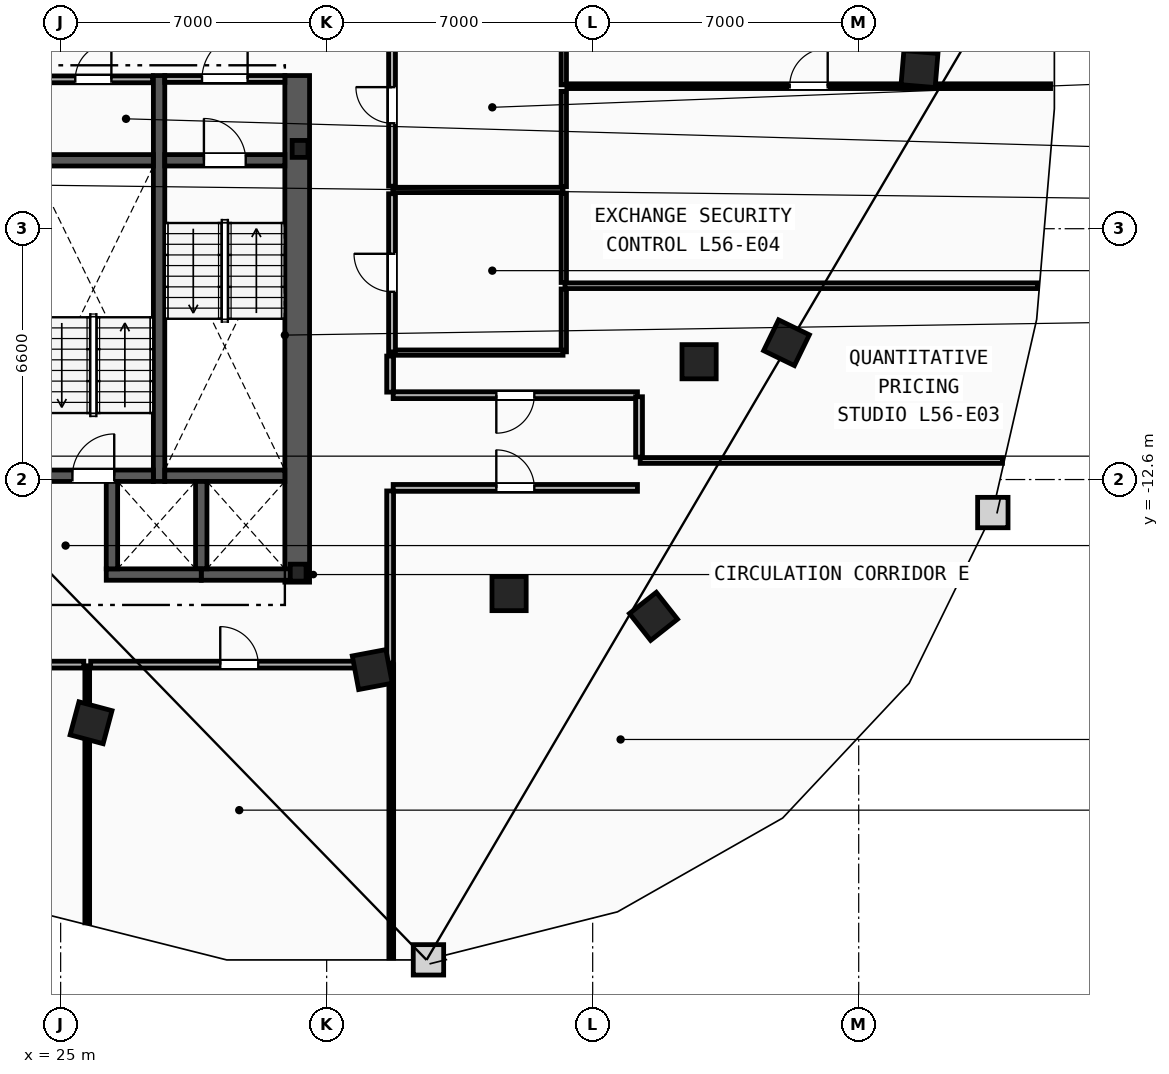
"""IFC4 building model, lengths in metres.
Left out: names, types, materials, properties, quantities, classifications, styles, units other than length and angle.
Written with IfcOpenShell. Run it as: python <this file> out.ifc"""

import sys

from ifc_helpers import new_model, si_unit, direction, frame, frame_2d, origin, origin_2d, place, context, subcontext, project, spatial, rectangle, i_section, extrude, element, fill, save


model = new_model("IFC4")
c1 = context("Model", 3, precision=1e-05, world=origin(), true_north=direction((0.0, 1.0)))
c2 = subcontext(c1, "Body", "Model", "MODEL_VIEW")
j1 = project(units=[si_unit("LENGTHUNIT", "METRE"), si_unit("PLANEANGLEUNIT", "RADIAN")], contexts=[c1])
p1 = place(None, origin())
s1 = spatial("IfcSite", under=j1, at=p1, CompositionType="ELEMENT")
p2 = place(p1, origin())
s2 = spatial("IfcBuilding", under=s1, at=p2, CompositionType="ELEMENT")
p3 = place(p2, frame((0.0, 0.0, 213.4)))
s3 = spatial("IfcBuildingStorey", under=s2, at=p3, CompositionType="ELEMENT", Elevation=213.4)
for number, where, z_axis, x_axis in (
    (1, (31.3, -3.9, 0.0), (0.0, 0.0, 1.0), (1.0, 0.0, 0.0)),
    (2, (31.25, -15.05, 0.0), (0.0, 0.0, 1.0), (1.0, 0.0, 0.0)),
):
    element("IfcColumn", number, at=place(p3, frame(where, z_axis=z_axis, x_axis=x_axis)), inside=s3, PredefinedType="COLUMN", context=c2, shape_type="SweptSolid", body=[
        extrude(i_section(OverallWidth=0.416, OverallDepth=0.446, WebThickness=0.039, FlangeThickness=0.063, FilletRadius=0.018, at=origin_2d()), origin(), (0.0, 0.0, 1.0), 3.6),
    ])
for number, where, z_axis, x_axis in (
    (3, (41.8, -9.5, 0.0), (0.0, 0.0, 1.0), (1.0, 0.0, 0.0)),
    (4, (36.8, -15.6, 0.0), (0.0, 0.0, 1.0), (1.0, 0.0, 0.0)),
    (5, (25.8, -19.0, 0.0), (0.0, 0.0, 1.0), (0.966, -0.259, 0.0)),
    (6, (33.2, -17.6, 0.0), (0.0, 0.0, 1.0), (0.983, 0.186, 0.0)),
    (7, (40.6, -16.2, 0.0), (0.0, 0.0, 1.0), (0.785, 0.619, 0.0)),
    (8, (44.1, -9.0, 0.0), (0.0, 0.0, 1.0), (0.437, 0.899, 0.0)),
    (9, (47.6, -1.8, 0.0), (0.0, 0.0, 1.0), (0.084, 0.997, 0.0)),
):
    element("IfcColumn", number, at=place(p3, frame(where, z_axis=z_axis, x_axis=x_axis)), inside=s3, PredefinedType="COLUMN", context=c2, shape_type="SweptSolid", body=[
        extrude(rectangle(XDim=0.9, YDim=0.9, at=origin_2d()), origin(), (0.0, 0.0, 1.0), 3.6),
    ])
p4 = place(p3, frame((31.225, -15.3, 0.0), z_axis=(0.0, 0.0, 1.0), x_axis=(0.0, 1.0, 0.0)))
e10 = element("IfcWall", 10, at=p4, inside=s3, PredefinedType="SHEAR", context=c2, shape_type="SweptSolid", body=[
    extrude(rectangle(XDim=13.33, YDim=0.65, at=frame_2d((6.665, 0.0))), origin(), (0.0, 0.0, 1.0), 3.34),
])
p5 = place(p3, frame((27.59, -12.65, 0.0), z_axis=(0.0, 0.0, 1.0), x_axis=(0.0, 1.0, 0.0)))
e11 = element("IfcWall", 11, at=p5, inside=s3, PredefinedType="SHEAR", context=c2, shape_type="SweptSolid", body=[
    extrude(rectangle(XDim=10.68, YDim=0.3, at=frame_2d((5.34, 0.0))), origin(), (0.0, 0.0, 1.0), 3.34),
])
p6 = place(p3, frame((27.74, -4.2, 0.0), z_axis=(0.0, 0.0, 1.0), x_axis=(1.0, 0.0, 0.0)))
e12 = element("IfcWall", 12, at=p6, inside=s3, PredefinedType="SHEAR", context=c2, shape_type="SweptSolid", body=[
    extrude(rectangle(XDim=3.16, YDim=0.3, at=frame_2d((1.58, 0.0))), origin(), (0.0, 0.0, 1.0), 3.34),
])
p7 = place(p6, frame((1.03, 0.0, 0.0)))
e13 = element("IfcOpeningElement", 13, at=p7, cuts=e12, PredefinedType="OPENING", context=c2, shape_type="SweptSolid", body=[
    extrude(rectangle(XDim=1.1, YDim=2.15, at=frame_2d((0.55, 1.075))), frame((0.0, 0.16, 0.0), z_axis=(0.0, -1.0, 0.0), x_axis=(1.0, 0.0, 0.0)), (0.0, 0.0, 1.0), 0.32),
])
p8 = place(p3, frame((27.74, -12.5, 0.0), z_axis=(0.0, 0.0, 1.0), x_axis=(1.0, 0.0, 0.0)))
e14 = element("IfcWall", 14, at=p8, inside=s3, PredefinedType="SHEAR", context=c2, shape_type="SweptSolid", body=[
    extrude(rectangle(XDim=3.16, YDim=0.3, at=frame_2d((1.58, 0.0))), origin(), (0.0, 0.0, 1.0), 3.34),
])
p9 = place(p3, frame((24.28, -12.5, 0.0), z_axis=(0.0, 0.0, 1.0), x_axis=(1.0, 0.0, 0.0)))
e15 = element("IfcWall", 15, at=p9, inside=s3, PredefinedType="SHEAR", context=c2, shape_type="SweptSolid", body=[
    extrude(rectangle(XDim=3.16, YDim=0.3, at=frame_2d((1.58, 0.0))), origin(), (0.0, 0.0, 1.0), 3.34),
])
p10 = place(p9, frame((1.03, 0.0, 0.0)))
e16 = element("IfcOpeningElement", 16, at=p10, cuts=e15, PredefinedType="OPENING", context=c2, shape_type="SweptSolid", body=[
    extrude(rectangle(XDim=1.1, YDim=2.15, at=frame_2d((0.55, 1.075))), frame((0.0, 0.16, 0.0), z_axis=(0.0, -1.0, 0.0), x_axis=(1.0, 0.0, 0.0)), (0.0, 0.0, 1.0), 0.32),
])
p11 = place(p3, frame((24.28, -4.2, 0.0), z_axis=(0.0, 0.0, 1.0), x_axis=(1.0, 0.0, 0.0)))
e17 = element("IfcWall", 17, at=p11, inside=s3, PredefinedType="SHEAR", context=c2, shape_type="SweptSolid", body=[
    extrude(rectangle(XDim=3.16, YDim=0.3, at=frame_2d((1.58, 0.0))), origin(), (0.0, 0.0, 1.0), 3.34),
])
p12 = place(p3, frame((27.74, -2.06, 0.0), z_axis=(0.0, 0.0, 1.0), x_axis=(1.0, 0.0, 0.0)))
e18 = element("IfcWall", 18, at=p12, inside=s3, PredefinedType="PARTITIONING", context=c2, shape_type="SweptSolid", body=[
    extrude(rectangle(XDim=3.16, YDim=0.18, at=frame_2d((1.58, 0.0))), origin(), (0.0, 0.0, 1.0), 3.34),
])
p13 = place(p12, frame((0.98, 0.0, 0.0)))
e19 = element("IfcOpeningElement", 19, at=p13, cuts=e18, PredefinedType="OPENING", context=c2, shape_type="SweptSolid", body=[
    extrude(rectangle(XDim=1.2, YDim=2.15, at=frame_2d((0.6, 1.075))), frame((0.0, 0.1, 0.0), z_axis=(0.0, -1.0, 0.0), x_axis=(1.0, 0.0, 0.0)), (0.0, 0.0, 1.0), 0.2),
])
p14 = place(p3, frame((28.7, -15.1, 0.0), z_axis=(0.0, 0.0, 1.0), x_axis=(1.0, 0.0, 0.0)))
e20 = element("IfcWall", 20, at=p14, inside=s3, PredefinedType="SHEAR", context=c2, shape_type="SweptSolid", body=[
    extrude(rectangle(XDim=2.5, YDim=0.3, at=frame_2d((1.25, 0.0))), origin(), (0.0, 0.0, 1.0), 3.34),
])
p15 = place(p3, frame((28.7, -14.95, 0.0), z_axis=(0.0, 0.0, 1.0), x_axis=(0.0, 1.0, 0.0)))
e21 = element("IfcWall", 21, at=p15, inside=s3, PredefinedType="SHEAR", context=c2, shape_type="SweptSolid", body=[
    extrude(rectangle(XDim=2.3, YDim=0.3, at=frame_2d((1.15, 0.0))), origin(), (0.0, 0.0, 1.0), 3.34),
])
p16 = place(p3, frame((26.2, -15.1, 0.0), z_axis=(0.0, 0.0, 1.0), x_axis=(1.0, 0.0, 0.0)))
e22 = element("IfcWall", 22, at=p16, inside=s3, PredefinedType="SHEAR", context=c2, shape_type="SweptSolid", body=[
    extrude(rectangle(XDim=2.5, YDim=0.3, at=frame_2d((1.25, 0.0))), origin(), (0.0, 0.0, 1.0), 3.34),
])
p17 = place(p3, frame((26.35, -14.95, 0.0), z_axis=(0.0, 0.0, 1.0), x_axis=(0.0, 1.0, 0.0)))
e23 = element("IfcWall", 23, at=p17, inside=s3, PredefinedType="SHEAR", context=c2, shape_type="SweptSolid", body=[
    extrude(rectangle(XDim=2.3, YDim=0.3, at=frame_2d((1.15, 0.0))), origin(), (0.0, 0.0, 1.0), 3.34),
])
p18 = place(p3, frame((24.3, -2.07, 0.0), z_axis=(0.0, 0.0, 1.0), x_axis=(1.0, 0.0, 0.0)))
e24 = element("IfcWall", 24, at=p18, inside=s3, PredefinedType="PARTITIONING", context=c2, shape_type="SweptSolid", body=[
    extrude(rectangle(XDim=3.12, YDim=0.18, at=frame_2d((1.56, 0.0))), origin(), (0.0, 0.0, 1.0), 3.34),
])
p19 = place(p18, frame((1.085, 0.0, 0.0)))
e25 = element("IfcOpeningElement", 25, at=p19, cuts=e24, PredefinedType="OPENING", context=c2, shape_type="SweptSolid", body=[
    extrude(rectangle(XDim=0.95, YDim=2.1, at=frame_2d((0.475, 1.05))), frame((0.0, 0.1, 0.0), z_axis=(0.0, -1.0, 0.0), x_axis=(1.0, 0.0, 0.0)), (0.0, 0.0, 1.0), 0.2),
])
p20 = place(p3, frame((38.24, -9.24, 0.0), z_axis=(0.0, 0.0, 1.0), x_axis=(0.0, 1.0, 0.0)))
e26 = element("IfcWall", 26, at=p20, inside=s3, PredefinedType="PARTITIONING", context=c2, shape_type="SweptSolid", body=[
    extrude(rectangle(XDim=1.655, YDim=0.14, at=frame_2d((0.828, 0.0))), origin(), (0.0, 0.0, 1.0), 3.34),
])
p21 = place(p3, frame((38.24, -7.415, 0.0), z_axis=(0.0, 0.0, 1.0), x_axis=(0.0, 1.0, 0.0)))
e27 = element("IfcWall", 27, at=p21, inside=s3, PredefinedType="PARTITIONING", context=c2, shape_type="SweptSolid", body=[
    extrude(rectangle(XDim=2.35, YDim=0.14, at=frame_2d((1.175, 0.0))), origin(), (0.0, 0.0, 1.0), 3.34),
])
p22 = place(p3, frame((38.24, -4.895, 0.0), z_axis=(0.0, 0.0, 1.0), x_axis=(0.0, 1.0, 0.0)))
e28 = element("IfcWall", 28, at=p22, inside=s3, PredefinedType="PARTITIONING", context=c2, shape_type="SweptSolid", body=[
    extrude(rectangle(XDim=2.51, YDim=0.14, at=frame_2d((1.255, 0.0))), origin(), (0.0, 0.0, 1.0), 3.34),
])
p23 = place(p3, frame((38.24, -2.215, 0.0), z_axis=(0.0, 0.0, 1.0), x_axis=(0.0, 1.0, 0.0)))
e29 = element("IfcWall", 29, at=p23, inside=s3, PredefinedType="PARTITIONING", context=c2, shape_type="SweptSolid", body=[
    extrude(rectangle(XDim=1.595, YDim=0.14, at=frame_2d((0.797, 0.0))), origin(), (0.0, 0.0, 1.0), 3.34),
])
for number, where, z_axis, x_axis in (
    (30, (33.74, -4.98, 0.0), (0.0, 0.0, 1.0), (1.0, 0.0, 0.0)),
    (31, (33.74, -9.26, 0.0), (0.0, 0.0, 1.0), (1.0, 0.0, 0.0)),
):
    element("IfcWall", number, at=place(p3, frame(where, z_axis=z_axis, x_axis=x_axis)), inside=s3, PredefinedType="PARTITIONING", context=c2, shape_type="SweptSolid", body=[
        extrude(rectangle(XDim=4.48, YDim=0.14, at=frame_2d((2.24, 0.0))), origin(), (0.0, 0.0, 1.0), 3.34),
    ])
p24 = place(p3, frame((33.72, -4.88, 0.0), z_axis=(0.0, 0.0, 1.0), x_axis=(0.0, 1.0, 0.0)))
e32 = element("IfcWall", 32, at=p24, inside=s3, PredefinedType="PARTITIONING", context=c2, shape_type="SweptSolid", body=[
    extrude(rectangle(XDim=4.26, YDim=0.18, at=frame_2d((2.13, 0.0))), origin(), (0.0, 0.0, 1.0), 3.34),
])
p25 = place(p24, frame((1.655, 0.0, 0.0)))
e33 = element("IfcOpeningElement", 33, at=p25, cuts=e32, PredefinedType="OPENING", context=c2, shape_type="SweptSolid", body=[
    extrude(rectangle(XDim=0.95, YDim=2.1, at=frame_2d((0.475, 1.05))), frame((0.0, 0.1, 0.0), z_axis=(0.0, -1.0, 0.0), x_axis=(1.0, 0.0, 0.0)), (0.0, 0.0, 1.0), 0.2),
])
p26 = place(p3, frame((33.72, -9.24, 0.0), z_axis=(0.0, 0.0, 1.0), x_axis=(0.0, 1.0, 0.0)))
e34 = element("IfcWall", 34, at=p26, inside=s3, PredefinedType="PARTITIONING", context=c2, shape_type="SweptSolid", body=[
    extrude(rectangle(XDim=4.16, YDim=0.18, at=frame_2d((2.08, 0.0))), origin(), (0.0, 0.0, 1.0), 3.34),
])
p27 = place(p26, frame((1.58, 0.0, 0.0)))
e35 = element("IfcOpeningElement", 35, at=p27, cuts=e34, PredefinedType="OPENING", context=c2, shape_type="SweptSolid", body=[
    extrude(rectangle(XDim=1.0, YDim=2.15, at=frame_2d((0.5, 1.075))), frame((0.0, 0.1, 0.0), z_axis=(0.0, -1.0, 0.0), x_axis=(1.0, 0.0, 0.0)), (0.0, 0.0, 1.0), 0.2),
])
p28 = place(p3, frame((38.27, -7.5, 0.0), z_axis=(0.0, 0.0, 1.0), x_axis=(1.0, 0.0, 0.0)))
e36 = element("IfcWall", 36, at=p28, inside=s3, PredefinedType="PARTITIONING", context=c2, shape_type="SweptSolid", body=[
    extrude(rectangle(XDim=12.438, YDim=0.15, at=frame_2d((6.219, 0.0))), origin(), (0.0, 0.0, 1.0), 3.34),
])
p29 = place(p3, frame((40.25, -12.1, 0.0), z_axis=(0.0, 0.0, 1.0), x_axis=(1.0, 0.0, 0.0)))
e37 = element("IfcWall", 37, at=p29, inside=s3, PredefinedType="PARTITIONING", context=c2, shape_type="SweptSolid", body=[
    extrude(rectangle(XDim=9.532, YDim=0.15, at=frame_2d((4.766, 0.0))), origin(), (0.0, 0.0, 1.0), 3.34),
])
p30 = place(p3, frame((25.7, -24.265, 0.0), z_axis=(0.0, 0.0, 1.0), x_axis=(0.0, 1.0, 0.0)))
e38 = element("IfcWall", 38, at=p30, inside=s3, PredefinedType="PARTITIONING", context=c2, shape_type="SweptSolid", body=[
    extrude(rectangle(XDim=6.765, YDim=0.125, at=frame_2d((3.382, 0.0))), origin(), (0.0, 0.0, 1.0), 3.34),
])
p31 = place(p3, frame((33.7, -25.19, 0.0), z_axis=(0.0, 0.0, 1.0), x_axis=(0.0, 1.0, 0.0)))
e39 = element("IfcWall", 39, at=p31, inside=s3, PredefinedType="PARTITIONING", context=c2, shape_type="SweptSolid", body=[
    extrude(rectangle(XDim=7.72, YDim=0.125, at=frame_2d((3.86, 0.0))), origin(), (0.0, 0.0, 1.0), 3.34),
])
p32 = place(p3, frame((25.79, -17.47, 0.0), z_axis=(0.0, 0.0, 1.0), x_axis=(1.0, 0.0, 0.0)))
e40 = element("IfcWall", 40, at=p32, inside=s3, PredefinedType="PARTITIONING", context=c2, shape_type="SweptSolid", body=[
    extrude(rectangle(XDim=7.82, YDim=0.18, at=frame_2d((3.91, 0.0))), origin(), (0.0, 0.0, 1.0), 3.34),
])
p33 = place(p32, frame((3.41, 0.0, 0.0)))
e41 = element("IfcOpeningElement", 41, at=p33, cuts=e40, PredefinedType="OPENING", context=c2, shape_type="SweptSolid", body=[
    extrude(rectangle(XDim=1.0, YDim=2.15, at=frame_2d((0.5, 1.075))), frame((0.0, 0.1, 0.0), z_axis=(0.0, -1.0, 0.0), x_axis=(1.0, 0.0, 0.0)), (0.0, 0.0, 1.0), 0.2),
])
p34 = place(p3, frame((33.75, -12.82, 0.0), z_axis=(0.0, 0.0, 1.0), x_axis=(1.0, 0.0, 0.0)))
e42 = element("IfcWall", 42, at=p34, inside=s3, PredefinedType="PARTITIONING", context=c2, shape_type="SweptSolid", body=[
    extrude(rectangle(XDim=6.428, YDim=0.18, at=frame_2d((3.214, 0.0))), origin(), (0.0, 0.0, 1.0), 3.34),
])
p35 = place(p34, frame((2.714, 0.0, 0.0)))
e43 = element("IfcOpeningElement", 43, at=p35, cuts=e42, PredefinedType="OPENING", context=c2, shape_type="SweptSolid", body=[
    extrude(rectangle(XDim=1.0, YDim=2.15, at=frame_2d((0.5, 1.075))), frame((0.0, 0.1, 0.0), z_axis=(0.0, -1.0, 0.0), x_axis=(1.0, 0.0, 0.0)), (0.0, 0.0, 1.0), 0.2),
])
p36 = place(p3, frame((33.67, -17.43, 0.0), z_axis=(0.0, 0.0, 1.0), x_axis=(0.0, 1.0, 0.0)))
e44 = element("IfcWall", 44, at=p36, inside=s3, PredefinedType="PARTITIONING", context=c2, shape_type="SweptSolid", body=[
    extrude(rectangle(XDim=4.53, YDim=0.18, at=frame_2d((2.265, 0.0))), origin(), (0.0, 0.0, 1.0), 3.34),
])
p37 = place(p3, frame((40.178, -10.38, 0.0), z_axis=(0.0, 0.0, 1.0), x_axis=(-1.0, 0.0, 0.0)))
e45 = element("IfcWall", 45, at=p37, inside=s3, PredefinedType="PARTITIONING", context=c2, shape_type="SweptSolid", body=[
    extrude(rectangle(XDim=6.428, YDim=0.18, at=frame_2d((3.214, 0.0))), origin(), (0.0, 0.0, 1.0), 3.34),
])
p38 = place(p37, frame((2.714, 0.0, 0.0)))
e46 = element("IfcOpeningElement", 46, at=p38, cuts=e45, PredefinedType="OPENING", context=c2, shape_type="SweptSolid", body=[
    extrude(rectangle(XDim=1.0, YDim=2.15, at=frame_2d((0.5, 1.075))), frame((0.0, 0.1, 0.0), z_axis=(0.0, -1.0, 0.0), x_axis=(1.0, 0.0, 0.0)), (0.0, 0.0, 1.0), 0.2),
])
p39 = place(p3, frame((40.22, -12.01, 0.0), z_axis=(0.0, 0.0, 1.0), x_axis=(0.0, 1.0, 0.0)))
e47 = element("IfcWall", 47, at=p39, inside=s3, PredefinedType="PARTITIONING", context=c2, shape_type="SweptSolid", body=[
    extrude(rectangle(XDim=1.589, YDim=0.18, at=frame_2d((0.794, 0.0))), origin(), (0.0, 0.0, 1.0), 3.34),
])
p40 = place(p3, frame((33.67, -10.3, 0.0), z_axis=(0.0, 0.0, 1.0), x_axis=(0.0, 1.0, 0.0)))
e48 = element("IfcWall", 48, at=p40, inside=s3, PredefinedType="PARTITIONING", context=c2, shape_type="SweptSolid", body=[
    extrude(rectangle(XDim=0.949, YDim=0.18, at=frame_2d((0.474, 0.0))), origin(), (0.0, 0.0, 1.0), 3.34),
])
p41 = place(p3, frame((16.822, -17.47, 0.0), z_axis=(0.0, 0.0, 1.0), x_axis=(1.0, 0.0, 0.0)))
e49 = element("IfcWall", 49, at=p41, inside=s3, PredefinedType="PARTITIONING", context=c2, shape_type="SweptSolid", body=[
    extrude(rectangle(XDim=8.789, YDim=0.18, at=frame_2d((4.394, 0.0))), origin(), (0.0, 0.0, 1.0), 3.34),
])
p42 = place(p3, frame((38.32, -2.25, 0.0), z_axis=(0.0, 0.0, 1.0), x_axis=(1.0, 0.0, 0.0)))
e50 = element("IfcWall", 50, at=p42, inside=s3, PredefinedType="PARTITIONING", context=c2, shape_type="SweptSolid", body=[
    extrude(rectangle(XDim=12.729, YDim=0.125, at=frame_2d((6.365, 0.0))), origin(), (0.0, 0.0, 1.0), 3.34),
])
p43 = place(p42, frame((5.865, 0.0, 0.0)))
e51 = element("IfcOpeningElement", 51, at=p43, cuts=e50, PredefinedType="OPENING", context=c2, shape_type="SweptSolid", body=[
    extrude(rectangle(XDim=1.0, YDim=2.15, at=frame_2d((0.5, 1.075))), frame((0.0, 0.073, 0.0), z_axis=(0.0, -1.0, 0.0), x_axis=(1.0, 0.0, 0.0)), (0.0, 0.0, 1.0), 0.145),
])
p44 = place(p7, origin())
e52 = element("IfcDoor", 52, at=p44, inside=s3, OperationType="SINGLE_SWING_LEFT", PredefinedType="DOOR", context=c2, shape_type="SweptSolid", body=[
    extrude(rectangle(XDim=1.1, YDim=2.15, at=frame_2d((0.55, 1.075))), frame((0.0, 0.025, 0.0), z_axis=(0.0, -1.0, 0.0), x_axis=(1.0, 0.0, 0.0)), (0.0, 0.0, 1.0), 0.05),
])
fill(e13, e52)
p45 = place(p10, origin())
e53 = element("IfcDoor", 53, at=p45, inside=s3, OperationType="SINGLE_SWING_RIGHT", PredefinedType="DOOR", context=c2, shape_type="SweptSolid", body=[
    extrude(rectangle(XDim=1.1, YDim=2.15, at=frame_2d((0.55, 1.075))), frame((0.0, 0.025, 0.0), z_axis=(0.0, -1.0, 0.0), x_axis=(1.0, 0.0, 0.0)), (0.0, 0.0, 1.0), 0.05),
])
fill(e16, e53)
p46 = place(p13, origin())
e54 = element("IfcDoor", 54, at=p46, inside=s3, OperationType="SINGLE_SWING_RIGHT", PredefinedType="DOOR", context=c2, shape_type="SweptSolid", body=[
    extrude(rectangle(XDim=1.2, YDim=2.15, at=frame_2d((0.6, 1.075))), frame((0.0, 0.025, 0.0), z_axis=(0.0, -1.0, 0.0), x_axis=(1.0, 0.0, 0.0)), (0.0, 0.0, 1.0), 0.05),
])
fill(e19, e54)
p47 = place(p43, origin())
e55 = element("IfcDoor", 55, at=p47, inside=s3, OperationType="SINGLE_SWING_RIGHT", PredefinedType="DOOR", context=c2, shape_type="SweptSolid", body=[
    extrude(rectangle(XDim=1.0, YDim=2.15, at=frame_2d((0.5, 1.075))), frame((0.0, 0.025, 0.0), z_axis=(0.0, -1.0, 0.0), x_axis=(1.0, 0.0, 0.0)), (0.0, 0.0, 1.0), 0.05),
])
fill(e51, e55)
p48 = place(p33, origin())
e56 = element("IfcDoor", 56, at=p48, inside=s3, OperationType="SINGLE_SWING_LEFT", PredefinedType="DOOR", context=c2, shape_type="SweptSolid", body=[
    extrude(rectangle(XDim=1.0, YDim=2.15, at=frame_2d((0.5, 1.075))), frame((0.0, 0.025, 0.0), z_axis=(0.0, -1.0, 0.0), x_axis=(1.0, 0.0, 0.0)), (0.0, 0.0, 1.0), 0.05),
])
fill(e41, e56)
p49 = place(p35, origin())
e57 = element("IfcDoor", 57, at=p49, inside=s3, OperationType="SINGLE_SWING_LEFT", PredefinedType="DOOR", context=c2, shape_type="SweptSolid", body=[
    extrude(rectangle(XDim=1.0, YDim=2.15, at=frame_2d((0.5, 1.075))), frame((0.0, 0.025, 0.0), z_axis=(0.0, -1.0, 0.0), x_axis=(1.0, 0.0, 0.0)), (0.0, 0.0, 1.0), 0.05),
])
fill(e43, e57)
p50 = place(p38, origin())
e58 = element("IfcDoor", 58, at=p50, inside=s3, OperationType="SINGLE_SWING_RIGHT", PredefinedType="DOOR", context=c2, shape_type="SweptSolid", body=[
    extrude(rectangle(XDim=1.0, YDim=2.15, at=frame_2d((0.5, 1.075))), frame((0.0, 0.025, 0.0), z_axis=(0.0, -1.0, 0.0), x_axis=(1.0, 0.0, 0.0)), (0.0, 0.0, 1.0), 0.05),
])
fill(e46, e58)
p51 = place(p25, origin())
e59 = element("IfcDoor", 59, at=p51, inside=s3, OperationType="SINGLE_SWING_RIGHT", PredefinedType="DOOR", context=c2, shape_type="SweptSolid", body=[
    extrude(rectangle(XDim=0.95, YDim=2.1, at=frame_2d((0.475, 1.05))), frame((0.0, 0.025, 0.0), z_axis=(0.0, -1.0, 0.0), x_axis=(1.0, 0.0, 0.0)), (0.0, 0.0, 1.0), 0.05),
])
fill(e33, e59)
p52 = place(p27, origin())
e60 = element("IfcDoor", 60, at=p52, inside=s3, OperationType="SINGLE_SWING_RIGHT", PredefinedType="DOOR", context=c2, shape_type="SweptSolid", body=[
    extrude(rectangle(XDim=1.0, YDim=2.15, at=frame_2d((0.5, 1.075))), frame((0.0, 0.025, 0.0), z_axis=(0.0, -1.0, 0.0), x_axis=(1.0, 0.0, 0.0)), (0.0, 0.0, 1.0), 0.05),
])
fill(e35, e60)
p53 = place(p19, origin())
e61 = element("IfcDoor", 61, at=p53, inside=s3, OperationType="SINGLE_SWING_RIGHT", PredefinedType="DOOR", context=c2, shape_type="SweptSolid", body=[
    extrude(rectangle(XDim=0.95, YDim=2.1, at=frame_2d((0.475, 1.05))), frame((0.0, 0.025, 0.0), z_axis=(0.0, -1.0, 0.0), x_axis=(1.0, 0.0, 0.0)), (0.0, 0.0, 1.0), 0.05),
])
fill(e25, e61)
save(model, sys.argv[1])
